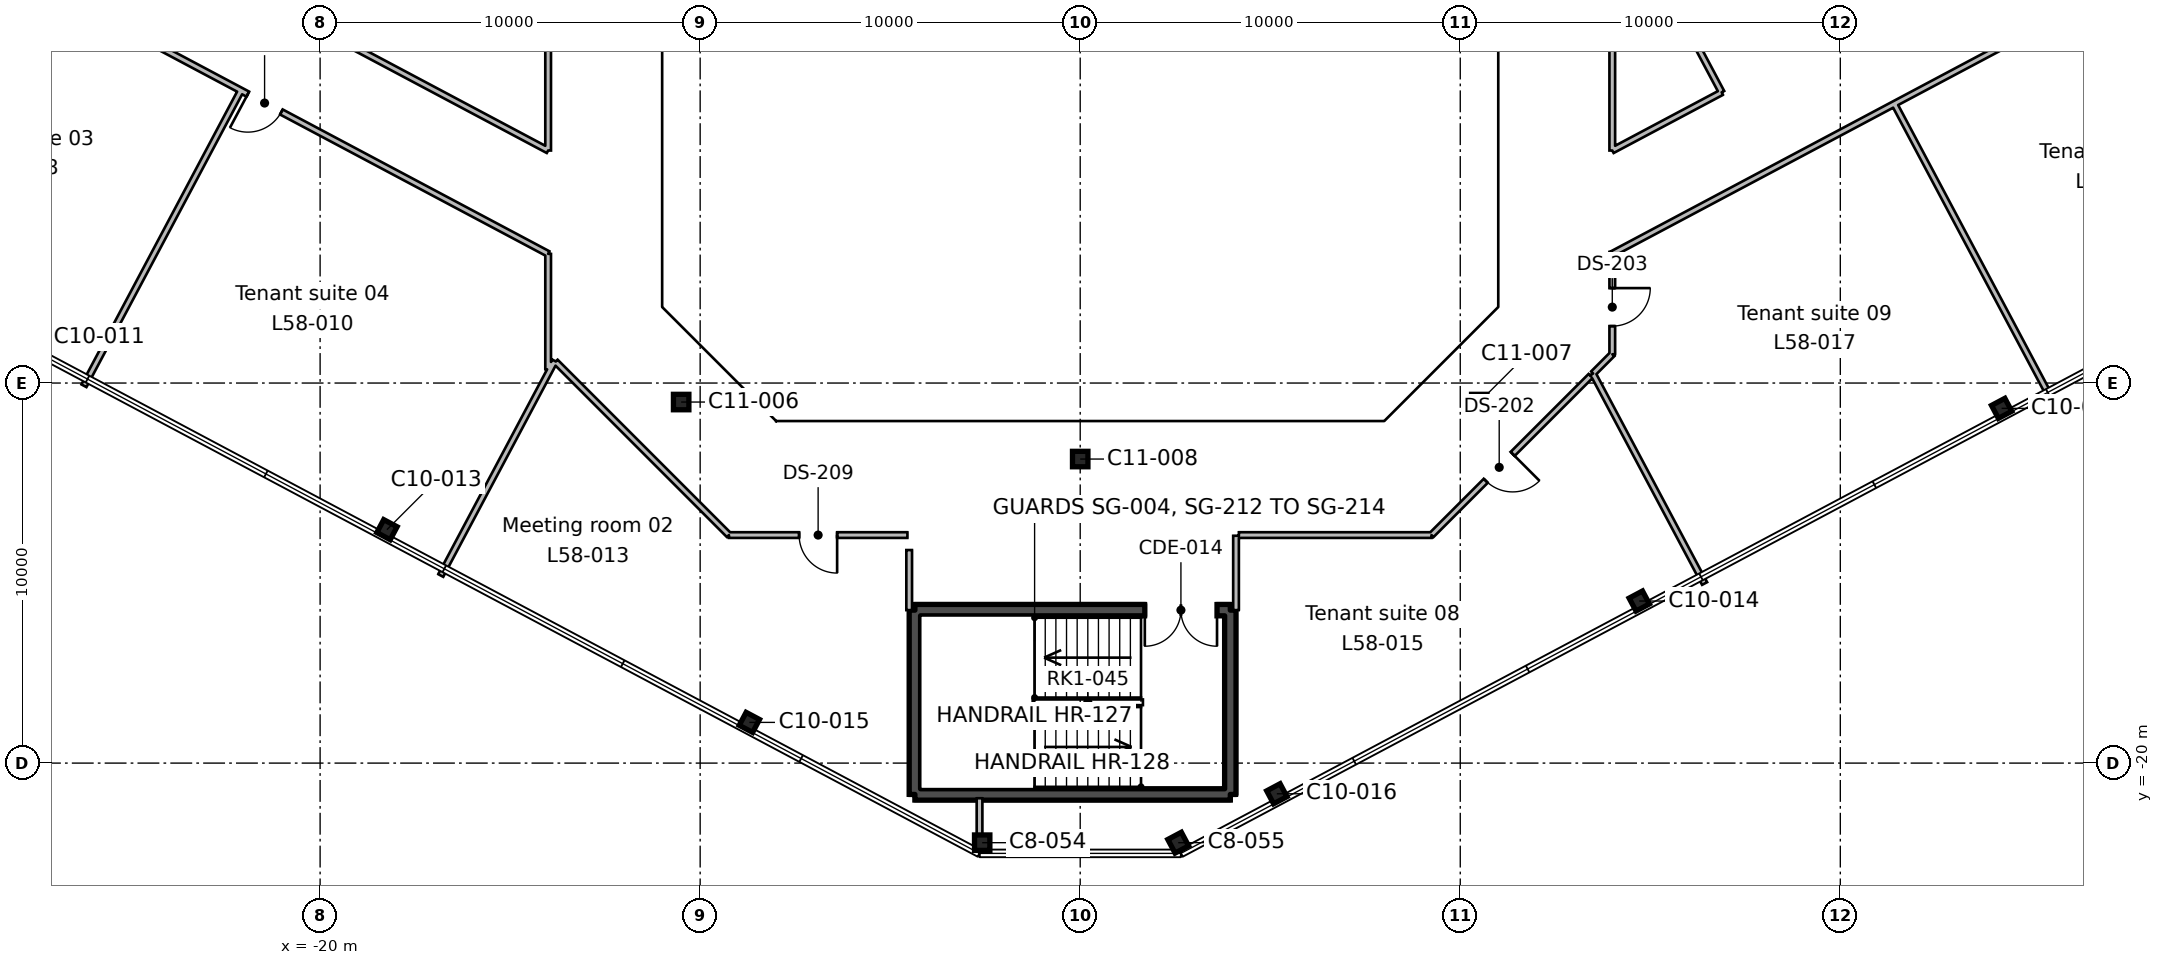
"""IFC4 building model, lengths in metres.
Left out: names, types, materials, properties, quantities, classifications, styles, units other than length and angle.
Written with IfcOpenShell. Run it as: python <this file> out.ifc"""

import sys

from ifc_helpers import new_model, si_unit, direction, frame, frame_2d, origin, origin_2d, place, context, subcontext, project, spatial, rectangle, hollow_rectangle, i_section, extrude, element, fill, save


model = new_model("IFC4")
c1 = context("Model", 3, precision=1e-05, world=origin(), true_north=direction((0.0, 1.0)))
c2 = subcontext(c1, "Body", "Model", "MODEL_VIEW")
j1 = project(units=[si_unit("LENGTHUNIT", "METRE"), si_unit("PLANEANGLEUNIT", "RADIAN")], contexts=[c1])
p1 = place(None, origin())
s1 = spatial("IfcSite", under=j1, at=p1, CompositionType="ELEMENT")
p2 = place(p1, origin())
s2 = spatial("IfcBuilding", under=s1, at=p2, CompositionType="ELEMENT")
p3 = place(p2, frame((0.0, 0.0, 261.9)))
s3 = spatial("IfcBuildingStorey", under=s2, at=p3, CompositionType="ELEMENT", Elevation=261.9)
for number, where, z_axis, x_axis in (
    (1, (-2.579, -22.094, 0.0), (0.0, 0.0, 1.0), (1.0, 0.0, 0.0)),
    (2, (2.579, -22.094, 0.0), (0.0, 0.0, 1.0), (0.883, 0.469, 0.0)),
):
    element("IfcColumn", number, at=place(p3, frame(where, z_axis=z_axis, x_axis=x_axis)), inside=s3, PredefinedType="COLUMN", context=c2, shape_type="SweptSolid", body=[
        extrude(i_section(OverallWidth=0.404, OverallDepth=0.406, WebThickness=0.027, FlangeThickness=0.044, FilletRadius=0.015, at=origin_2d()), origin(), (0.0, 0.0, 1.0), 3.9),
    ])
for number, where, z_axis, x_axis in (
    (3, (5.174, -20.807, 0.0), (0.0, 0.0, 1.0), (0.883, 0.469, 0.0)),
    (4, (-8.705, -18.929, 0.0), (0.0, 0.0, 1.0), (0.883, -0.469, 0.0)),
    (5, (14.71, -15.736, 0.0), (0.0, 0.0, 1.0), (0.883, 0.469, 0.0)),
    (6, (-18.241, -13.858, 0.0), (0.0, 0.0, 1.0), (0.883, -0.469, 0.0)),
):
    element("IfcColumn", number, at=place(p3, frame(where, z_axis=z_axis, x_axis=x_axis)), inside=s3, PredefinedType="COLUMN", context=c2, shape_type="SweptSolid", body=[
        extrude(i_section(OverallWidth=0.399, OverallDepth=0.386, WebThickness=0.021, FlangeThickness=0.033, FilletRadius=0.015, at=origin_2d()), origin(), (0.0, 0.0, 1.0), 3.9),
    ])
p4 = place(p3, frame((0.0, -12.0, 0.0), z_axis=(0.0, 0.0, 1.0), x_axis=(1.0, 0.0, 0.0)))
e7 = element("IfcColumn", 7, at=p4, inside=s3, PredefinedType="COLUMN", context=c2, shape_type="SweptSolid", body=[
    extrude(hollow_rectangle(XDim=0.406, YDim=0.406, WallThickness=0.009, InnerFilletRadius=0.004, OuterFilletRadius=0.013, at=origin_2d()), origin(), (0.0, 0.0, 1.0), 3.9),
])
p5 = place(p3, frame((24.245, -10.666, 0.0), z_axis=(0.0, 0.0, 1.0), x_axis=(0.882947592859, 0.469471562786, 0.0)))
e8 = element("IfcColumn", 8, at=p5, inside=s3, PredefinedType="COLUMN", context=c2, shape_type="SweptSolid", body=[
    extrude(i_section(OverallWidth=0.399, OverallDepth=0.386, WebThickness=0.021, FlangeThickness=0.033, FilletRadius=0.015, at=origin_2d()), origin(), (0.0, 0.0, 1.0), 3.9),
])
for number, where, z_axis, x_axis in (
    (9, (-10.5, -10.5, 0.0), (0.0, 0.0, 1.0), (1.0, 0.0, 0.0)),
    (10, (10.5, -10.5, 0.0), (0.0, 0.0, 1.0), (1.0, 0.0, 0.0)),
):
    element("IfcColumn", number, at=place(p3, frame(where, z_axis=z_axis, x_axis=x_axis)), inside=s3, PredefinedType="COLUMN", context=c2, shape_type="SweptSolid", body=[
        extrude(hollow_rectangle(XDim=0.406, YDim=0.406, WallThickness=0.009, InnerFilletRadius=0.004, OuterFilletRadius=0.013, at=origin_2d()), origin(), (0.0, 0.0, 1.0), 3.9),
    ])
p6 = place(p3, frame((3.95, -15.975, 0.0), z_axis=(0.0, 0.0, 1.0), x_axis=(0.0, -1.0, 0.0)))
e11 = element("IfcWall", 11, at=p6, inside=s3, PredefinedType="SHEAR", context=c2, shape_type="SweptSolid", body=[
    extrude(rectangle(XDim=4.85, YDim=0.3, at=frame_2d((2.425, 0.0))), origin(), (0.0, 0.0, 1.0), 3.9),
])
p7 = place(p3, frame((3.95, -20.825, 0.0), z_axis=(0.0, 0.0, 1.0), x_axis=(-1.0, 0.0, 0.0)))
e12 = element("IfcWall", 12, at=p7, inside=s3, PredefinedType="SHEAR", context=c2, shape_type="SweptSolid", body=[
    extrude(rectangle(XDim=8.3, YDim=0.3, at=frame_2d((4.15, 0.0))), origin(), (0.0, 0.0, 1.0), 3.9),
])
p8 = place(p3, frame((-4.35, -20.825, 0.0), z_axis=(0.0, 0.0, 1.0), x_axis=(0.0, 1.0, 0.0)))
e13 = element("IfcWall", 13, at=p8, inside=s3, PredefinedType="SHEAR", context=c2, shape_type="SweptSolid", body=[
    extrude(rectangle(XDim=4.85, YDim=0.3, at=frame_2d((2.425, 0.0))), origin(), (0.0, 0.0, 1.0), 3.9),
])
p9 = place(p3, frame((-4.35, -15.975, 0.0), z_axis=(0.0, 0.0, 1.0), x_axis=(1.0, 0.0, 0.0)))
e14 = element("IfcWall", 14, at=p9, inside=s3, PredefinedType="SHEAR", context=c2, shape_type="SweptSolid", body=[
    extrude(rectangle(XDim=8.3, YDim=0.3, at=frame_2d((4.15, 0.0))), origin(), (0.0, 0.0, 1.0), 3.9),
])
p10 = place(p9, frame((6.05, 0.0, 0.0)))
e15 = element("IfcOpeningElement", 15, at=p10, cuts=e14, PredefinedType="OPENING", context=c2, shape_type="SweptSolid", body=[
    extrude(rectangle(XDim=1.9, YDim=2.1, at=frame_2d((0.95, 1.05))), frame((0.0, 0.16, 0.0), z_axis=(0.0, -1.0, 0.0), x_axis=(1.0, 0.0, 0.0)), (0.0, 0.0, 1.0), 0.32),
])
p11 = place(p3, frame((-14.0, -6.6, 0.0), z_axis=(0.0, 0.0, 1.0), x_axis=(-0.88294319167, 0.469479840125, 0.0)))
e16 = element("IfcWall", 16, at=p11, inside=s3, PredefinedType="PARTITIONING", context=c2, shape_type="SweptSolid", body=[
    extrude(rectangle(XDim=36.344, YDim=0.15, at=frame_2d((18.172, 0.0))), origin(), (0.0, 0.0, 1.0), 3.54),
])
p12 = place(p11, frame((25.35, 0.0, 0.0)))
e17 = element("IfcOpeningElement", 17, at=p12, cuts=e16, PredefinedType="OPENING", context=c2, shape_type="SweptSolid", body=[
    extrude(rectangle(XDim=1.0, YDim=2.1, at=frame_2d((0.5, 1.05))), frame((0.0, 0.085, 0.0), z_axis=(0.0, -1.0, 0.0), x_axis=(1.0, 0.0, 0.0)), (0.0, 0.0, 1.0), 0.17),
])
p13 = place(p11, frame((17.65, 0.0, 0.0)))
e18 = element("IfcOpeningElement", 18, at=p13, cuts=e16, PredefinedType="OPENING", context=c2, shape_type="SweptSolid", body=[
    extrude(rectangle(XDim=1.0, YDim=2.1, at=frame_2d((0.5, 1.05))), frame((0.0, 0.085, 0.0), z_axis=(0.0, -1.0, 0.0), x_axis=(1.0, 0.0, 0.0)), (0.0, 0.0, 1.0), 0.17),
])
p14 = place(p11, frame((7.95, 0.0, 0.0)))
e19 = element("IfcOpeningElement", 19, at=p14, cuts=e16, PredefinedType="OPENING", context=c2, shape_type="SweptSolid", body=[
    extrude(rectangle(XDim=1.0, YDim=2.1, at=frame_2d((0.5, 1.05))), frame((0.0, 0.085, 0.0), z_axis=(0.0, -1.0, 0.0), x_axis=(1.0, 0.0, 0.0)), (0.0, 0.0, 1.0), 0.17),
])
p15 = place(p3, frame((-22.083, -2.302, 0.0), z_axis=(0.0, 0.0, 1.0), x_axis=(-0.469445946219, -0.882961212952, 0.0)))
e20 = element("IfcWall", 20, at=p15, inside=s3, PredefinedType="PARTITIONING", context=c2, shape_type="SweptSolid", body=[
    extrude(rectangle(XDim=8.8, YDim=0.15, at=frame_2d((4.4, 0.0))), origin(), (0.0, 0.0, 1.0), 3.54),
])
p16 = place(p3, frame((-13.824, -9.419, 0.0), z_axis=(0.0, 0.0, 1.0), x_axis=(-0.469525578512, -0.882918870068, 0.0)))
e21 = element("IfcWall", 21, at=p16, inside=s3, PredefinedType="PARTITIONING", context=c2, shape_type="SweptSolid", body=[
    extrude(rectangle(XDim=6.394, YDim=0.15, at=frame_2d((3.197, 0.0))), origin(), (0.0, 0.0, 1.0), 3.54),
])
p17 = place(p3, frame((-14.0, -9.64, 0.0), z_axis=(0.0, 0.0, 1.0), x_axis=(0.0, 1.0, 0.0)))
e22 = element("IfcWall", 22, at=p17, inside=s3, PredefinedType="PARTITIONING", context=c2, shape_type="SweptSolid", body=[
    extrude(rectangle(XDim=3.04, YDim=0.15, at=frame_2d((1.52, 0.0))), origin(), (0.0, 0.0, 1.0), 3.54),
])
p18 = place(p3, frame((-4.546, -14.0, 0.0), z_axis=(0.0, 0.0, 1.0), x_axis=(-1.0, 0.0, 0.0)))
e23 = element("IfcWall", 23, at=p18, inside=s3, PredefinedType="PARTITIONING", context=c2, shape_type="SweptSolid", body=[
    extrude(rectangle(XDim=4.697, YDim=0.15, at=frame_2d((2.349, 0.0))), origin(), (0.0, 0.0, 1.0), 3.54),
])
p19 = place(p18, frame((1.85, 0.0, 0.0)))
e24 = element("IfcOpeningElement", 24, at=p19, cuts=e23, PredefinedType="OPENING", context=c2, shape_type="SweptSolid", body=[
    extrude(rectangle(XDim=1.0, YDim=2.1, at=frame_2d((0.5, 1.05))), frame((0.0, 0.085, 0.0), z_axis=(0.0, -1.0, 0.0), x_axis=(1.0, 0.0, 0.0)), (0.0, 0.0, 1.0), 0.17),
])
p20 = place(p3, frame((-9.243, -14.0, 0.0), z_axis=(0.0, 0.0, 1.0), x_axis=(-0.70703108598, 0.707182468291, 0.0)))
e25 = element("IfcWall", 25, at=p20, inside=s3, PredefinedType="PARTITIONING", context=c2, shape_type="SweptSolid", body=[
    extrude(rectangle(XDim=6.451, YDim=0.15, at=frame_2d((3.226, 0.0))), origin(), (0.0, 0.0, 1.0), 3.54),
])
p21 = place(p3, frame((-4.5, -15.975, 0.0), z_axis=(0.0, 0.0, 1.0), x_axis=(0.0, 1.0, 0.0)))
e26 = element("IfcWall", 26, at=p21, inside=s3, PredefinedType="PARTITIONING", context=c2, shape_type="SweptSolid", body=[
    extrude(rectangle(XDim=1.581, YDim=0.15, at=frame_2d((0.791, 0.0))), origin(), (0.0, 0.0, 1.0), 3.54),
])
p22 = place(p3, frame((-2.649, -20.925, 0.0), z_axis=(0.0, 0.0, 1.0), x_axis=(0.0, -1.0, 0.0)))
e27 = element("IfcWall", 27, at=p22, inside=s3, PredefinedType="PARTITIONING", context=c2, shape_type="SweptSolid", body=[
    extrude(rectangle(XDim=0.966, YDim=0.15, at=frame_2d((0.483, 0.0))), origin(), (0.0, 0.0, 1.0), 3.54),
])
p23 = place(p3, frame((4.1, -15.975, 0.0), z_axis=(0.0, 0.0, 1.0), x_axis=(0.0, 1.0, 0.0)))
e28 = element("IfcWall", 28, at=p23, inside=s3, PredefinedType="PARTITIONING", context=c2, shape_type="SweptSolid", body=[
    extrude(rectangle(XDim=1.957, YDim=0.15, at=frame_2d((0.979, 0.0))), origin(), (0.0, 0.0, 1.0), 3.54),
])
p24 = place(p3, frame((13.429, -9.814, 0.0), z_axis=(0.0, 0.0, 1.0), x_axis=(-0.707106781187, -0.707106781187, 0.0)))
e29 = element("IfcWall", 29, at=p24, inside=s3, PredefinedType="PARTITIONING", context=c2, shape_type="SweptSolid", body=[
    extrude(rectangle(XDim=5.92, YDim=0.15, at=frame_2d((2.96, 0.0))), origin(), (0.0, 0.0, 1.0), 3.54),
])
p25 = place(p24, frame((2.9, 0.0, 0.0)))
e30 = element("IfcOpeningElement", 30, at=p25, cuts=e29, PredefinedType="OPENING", context=c2, shape_type="SweptSolid", body=[
    extrude(rectangle(XDim=1.0, YDim=2.1, at=frame_2d((0.5, 1.05))), frame((0.0, 0.085, 0.0), z_axis=(0.0, -1.0, 0.0), x_axis=(1.0, 0.0, 0.0)), (0.0, 0.0, 1.0), 0.17),
])
p26 = place(p3, frame((9.243, -14.0, 0.0), z_axis=(0.0, 0.0, 1.0), x_axis=(-1.0, 0.0, 0.0)))
e31 = element("IfcWall", 31, at=p26, inside=s3, PredefinedType="PARTITIONING", context=c2, shape_type="SweptSolid", body=[
    extrude(rectangle(XDim=5.068, YDim=0.15, at=frame_2d((2.534, 0.0))), origin(), (0.0, 0.0, 1.0), 3.54),
])
p27 = place(p3, frame((13.491, -9.752, 0.0), z_axis=(0.0, 0.0, 1.0), x_axis=(0.469644039597, -0.882855863701, 0.0)))
e32 = element("IfcWall", 32, at=p27, inside=s3, PredefinedType="PARTITIONING", context=c2, shape_type="SweptSolid", body=[
    extrude(rectangle(XDim=6.256, YDim=0.15, at=frame_2d((3.128, 0.0))), origin(), (0.0, 0.0, 1.0), 3.54),
])
p28 = place(p3, frame((14.0, -6.55, 0.0), z_axis=(0.0, 0.0, 1.0), x_axis=(0.0, -1.0, 0.0)))
e33 = element("IfcWall", 33, at=p28, inside=s3, PredefinedType="PARTITIONING", context=c2, shape_type="SweptSolid", body=[
    extrude(rectangle(XDim=2.693, YDim=0.15, at=frame_2d((1.346, 0.0))), origin(), (0.0, 0.0, 1.0), 3.54),
])
p29 = place(p28, frame((0.952, 0.0, 0.0)))
e34 = element("IfcOpeningElement", 34, at=p29, cuts=e33, PredefinedType="OPENING", context=c2, shape_type="SweptSolid", body=[
    extrude(rectangle(XDim=1.0, YDim=2.1, at=frame_2d((0.5, 1.05))), frame((0.0, 0.085, 0.0), z_axis=(0.0, -1.0, 0.0), x_axis=(1.0, 0.0, 0.0)), (0.0, 0.0, 1.0), 0.17),
])
p30 = place(p3, frame((13.495, -9.748, 0.0), z_axis=(0.0, 0.0, 1.0), x_axis=(0.706252478894, 0.707960052585, 0.0)))
e35 = element("IfcWall", 35, at=p30, inside=s3, PredefinedType="PARTITIONING", context=c2, shape_type="SweptSolid", body=[
    extrude(rectangle(XDim=0.715, YDim=0.15, at=frame_2d((0.357, 0.0))), origin(), (0.0, 0.0, 1.0), 3.54),
])
p31 = place(p3, frame((21.421, -2.654, 0.0), z_axis=(0.0, 0.0, 1.0), x_axis=(0.469445946219, -0.882961212952, 0.0)))
e36 = element("IfcWall", 36, at=p31, inside=s3, PredefinedType="PARTITIONING", context=c2, shape_type="SweptSolid", body=[
    extrude(rectangle(XDim=8.8, YDim=0.15, at=frame_2d((4.4, 0.0))), origin(), (0.0, 0.0, 1.0), 3.54),
])
p32 = place(p3, frame((30.544, 2.197, 0.0), z_axis=(0.0, 0.0, 1.0), x_axis=(-0.88293548313, -0.469494337165, 0.0)))
e37 = element("IfcWall", 37, at=p32, inside=s3, PredefinedType="PARTITIONING", context=c2, shape_type="SweptSolid", body=[
    extrude(rectangle(XDim=18.738, YDim=0.15, at=frame_2d((9.369, 0.0))), origin(), (0.0, 0.0, 1.0), 3.54),
])
p33 = place(p3, frame((-14.0, 9.243, 0.0), z_axis=(0.0, 0.0, 1.0), x_axis=(0.0, -1.0, 0.0)))
e38 = element("IfcWall", 38, at=p33, inside=s3, PredefinedType="PARTITIONING", context=c2, shape_type="SweptSolid", body=[
    extrude(rectangle(XDim=13.125, YDim=0.15, at=frame_2d((6.562, 0.0))), origin(), (0.0, 0.0, 1.0), 3.54),
])
p34 = place(p3, frame((-14.0, -3.882, 0.0), z_axis=(0.0, 0.0, 1.0), x_axis=(-0.882921917986, 0.469519847014, 0.0)))
e39 = element("IfcWall", 39, at=p34, inside=s3, PredefinedType="PARTITIONING", context=c2, shape_type="SweptSolid", body=[
    extrude(rectangle(XDim=7.261, YDim=0.15, at=frame_2d((3.63, 0.0))), origin(), (0.0, 0.0, 1.0), 3.54),
])
p35 = place(p3, frame((14.0, -3.882, 0.0), z_axis=(0.0, 0.0, 1.0), x_axis=(0.882913997068, 0.469534741826, 0.0)))
e40 = element("IfcWall", 40, at=p35, inside=s3, PredefinedType="PARTITIONING", context=c2, shape_type="SweptSolid", body=[
    extrude(rectangle(XDim=3.261, YDim=0.15, at=frame_2d((1.63, 0.0))), origin(), (0.0, 0.0, 1.0), 3.54),
])
p36 = place(p3, frame((16.879, -2.351, 0.0), z_axis=(0.0, 0.0, 1.0), x_axis=(-0.469364750374, 0.883004377739, 0.0)))
e41 = element("IfcWall", 41, at=p36, inside=s3, PredefinedType="PARTITIONING", context=c2, shape_type="SweptSolid", body=[
    extrude(rectangle(XDim=6.134, YDim=0.15, at=frame_2d((3.067, 0.0))), origin(), (0.0, 0.0, 1.0), 3.54),
])
p37 = place(p3, frame((14.0, 3.065, 0.0), z_axis=(0.0, 0.0, 1.0), x_axis=(0.0, -1.0, 0.0)))
e42 = element("IfcWall", 42, at=p37, inside=s3, PredefinedType="PARTITIONING", context=c2, shape_type="SweptSolid", body=[
    extrude(rectangle(XDim=6.947, YDim=0.15, at=frame_2d((3.474, 0.0))), origin(), (0.0, 0.0, 1.0), 3.54),
])
p38 = place(p10, frame((1.9, 0.0, 0.0), z_axis=(0.0, 0.0, 1.0), x_axis=(-1.0, 0.0, 0.0)))
e43 = element("IfcDoor", 43, at=p38, inside=s3, OperationType="DOUBLE_DOOR_SINGLE_SWING", PredefinedType="DOOR", context=c2, shape_type="SweptSolid", body=[
    extrude(rectangle(XDim=1.9, YDim=2.1, at=frame_2d((0.95, 1.05))), frame((0.0, 0.025, 0.0), z_axis=(0.0, -1.0, 0.0), x_axis=(1.0, 0.0, 0.0)), (0.0, 0.0, 1.0), 0.05),
])
fill(e15, e43)
p39 = place(p25, origin())
e44 = element("IfcDoor", 44, at=p39, inside=s3, OperationType="SINGLE_SWING_LEFT", PredefinedType="DOOR", context=c2, shape_type="SweptSolid", body=[
    extrude(rectangle(XDim=1.0, YDim=2.1, at=frame_2d((0.5, 1.05))), frame((0.0, 0.025, 0.0), z_axis=(0.0, -1.0, 0.0), x_axis=(1.0, 0.0, 0.0)), (0.0, 0.0, 1.0), 0.05),
])
fill(e30, e44)
p40 = place(p29, origin())
e45 = element("IfcDoor", 45, at=p40, inside=s3, OperationType="SINGLE_SWING_LEFT", PredefinedType="DOOR", context=c2, shape_type="SweptSolid", body=[
    extrude(rectangle(XDim=1.0, YDim=2.1, at=frame_2d((0.5, 1.05))), frame((0.0, 0.025, 0.0), z_axis=(0.0, -1.0, 0.0), x_axis=(1.0, 0.0, 0.0)), (0.0, 0.0, 1.0), 0.05),
])
fill(e34, e45)
p41 = place(p14, origin())
e46 = element("IfcDoor", 46, at=p41, inside=s3, OperationType="SINGLE_SWING_RIGHT", PredefinedType="DOOR", context=c2, shape_type="SweptSolid", body=[
    extrude(rectangle(XDim=1.0, YDim=2.1, at=frame_2d((0.5, 1.05))), frame((0.0, 0.025, 0.0), z_axis=(0.0, -1.0, 0.0), x_axis=(1.0, 0.0, 0.0)), (0.0, 0.0, 1.0), 0.05),
])
fill(e19, e46)
p42 = place(p19, origin())
e47 = element("IfcDoor", 47, at=p42, inside=s3, OperationType="SINGLE_SWING_LEFT", PredefinedType="DOOR", context=c2, shape_type="SweptSolid", body=[
    extrude(rectangle(XDim=1.0, YDim=2.1, at=frame_2d((0.5, 1.05))), frame((0.0, 0.025, 0.0), z_axis=(0.0, -1.0, 0.0), x_axis=(1.0, 0.0, 0.0)), (0.0, 0.0, 1.0), 0.05),
])
fill(e24, e47)
save(model, sys.argv[1])
